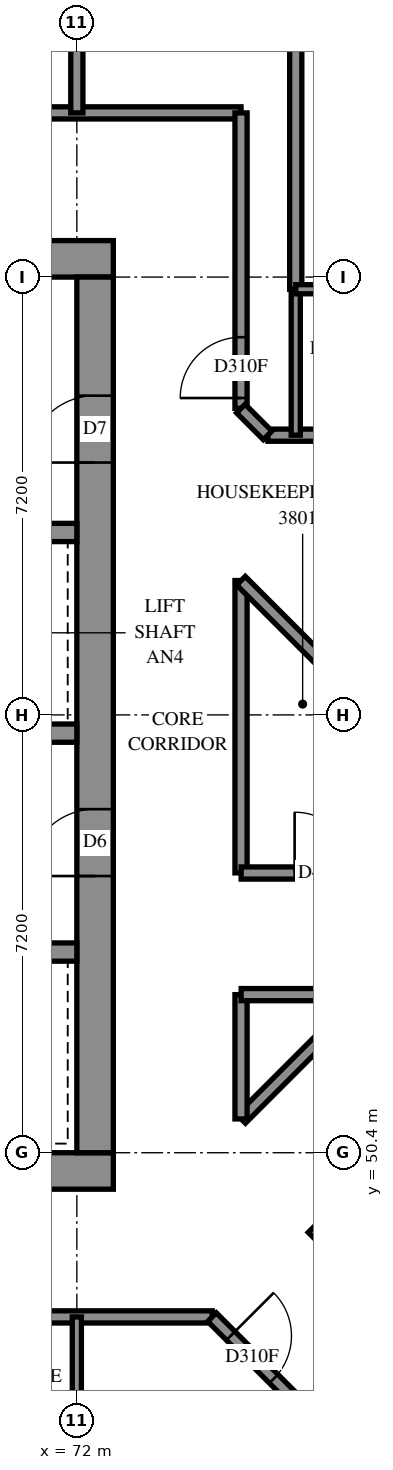
"""IFC4 building model, lengths in metres.
Left out: names, types, materials, properties, quantities, classifications, styles, units other than length and angle.
Written with IfcOpenShell. Run it as: python <this file> out.ifc"""

import sys

from ifc_helpers import new_model, si_unit, direction, frame, frame_2d, origin, place, context, subcontext, project, spatial, rectangle, extrude, element, fill, save


model = new_model("IFC4")
c1 = context("Model", 3, precision=1e-05, world=origin(), true_north=direction((0.0, 1.0)))
c2 = subcontext(c1, "Body", "Model", "MODEL_VIEW")
j1 = project(units=[si_unit("LENGTHUNIT", "METRE"), si_unit("PLANEANGLEUNIT", "RADIAN")], contexts=[c1])
p1 = place(None, origin())
s1 = spatial("IfcSite", under=j1, at=p1, CompositionType="ELEMENT")
p2 = place(p1, origin())
s2 = spatial("IfcBuilding", under=s1, at=p2, CompositionType="ELEMENT")
p3 = place(p2, frame((0.0, 0.0, 142.2)))
s3 = spatial("IfcBuildingStorey", under=s2, at=p3, CompositionType="ELEMENT", Elevation=142.2)
p4 = place(p3, frame((57.0, 50.1, -0.3), z_axis=(0.0, 0.0, 1.0), x_axis=(1.0, 0.0, 0.0)))
e1 = element("IfcWall", 1, at=p4, inside=s3, PredefinedType="SHEAR", context=c2, shape_type="SweptSolid", body=[
    extrude(rectangle(XDim=15.6, YDim=0.6, at=frame_2d((7.8, 0.0))), origin(), (0.0, 0.0, 1.0), 2.7),
])
p5 = place(p3, frame((57.0, 65.1, -0.3), z_axis=(0.0, 0.0, 1.0), x_axis=(1.0, 0.0, 0.0)))
e2 = element("IfcWall", 2, at=p5, inside=s3, PredefinedType="SHEAR", context=c2, shape_type="SweptSolid", body=[
    extrude(rectangle(XDim=15.6, YDim=0.6, at=frame_2d((7.8, 0.0))), origin(), (0.0, 0.0, 1.0), 2.7),
])
p6 = place(p5, frame((10.6, 0.0, 0.3)))
e3 = element("IfcOpeningElement", 3, at=p6, cuts=e2, PredefinedType="OPENING", context=c2, shape_type="SweptSolid", body=[
    extrude(rectangle(XDim=0.8, YDim=2.1, at=frame_2d((0.4, 1.05))), frame((0.0, 0.31, 0.0), z_axis=(0.0, -1.0, 0.0), x_axis=(1.0, 0.0, 0.0)), (0.0, 0.0, 1.0), 0.62),
])
p7 = place(p3, frame((72.3, 50.4, -0.3), z_axis=(0.0, 0.0, 1.0), x_axis=(0.0, 1.0, 0.0)))
e4 = element("IfcWall", 4, at=p7, inside=s3, PredefinedType="SHEAR", context=c2, shape_type="SweptSolid", body=[
    extrude(rectangle(XDim=14.4, YDim=0.6, at=frame_2d((7.2, 0.0))), origin(), (0.0, 0.0, 1.0), 2.7),
])
p8 = place(p7, frame((4.55, 0.0, 0.3)))
e5 = element("IfcOpeningElement", 5, at=p8, cuts=e4, PredefinedType="OPENING", context=c2, shape_type="SweptSolid", body=[
    extrude(rectangle(XDim=1.1, YDim=2.1, at=frame_2d((0.55, 1.05))), frame((0.0, 0.31, 0.0), z_axis=(0.0, -1.0, 0.0), x_axis=(1.0, 0.0, 0.0)), (0.0, 0.0, 1.0), 0.62),
])
p9 = place(p7, frame((11.35, 0.0, 0.3)))
e6 = element("IfcOpeningElement", 6, at=p9, cuts=e4, PredefinedType="OPENING", context=c2, shape_type="SweptSolid", body=[
    extrude(rectangle(XDim=1.1, YDim=2.1, at=frame_2d((0.55, 1.05))), frame((0.0, 0.31, 0.0), z_axis=(0.0, -1.0, 0.0), x_axis=(1.0, 0.0, 0.0)), (0.0, 0.0, 1.0), 0.62),
])
p10 = place(p3, frame((57.6, 53.7, 0.0), z_axis=(0.0, 0.0, 1.0), x_axis=(1.0, 0.0, 0.0)))
e7 = element("IfcWall", 7, at=p10, inside=s3, PredefinedType="SOLIDWALL", context=c2, shape_type="SweptSolid", body=[
    extrude(rectangle(XDim=14.4, YDim=0.3, at=frame_2d((7.2, 0.0))), origin(), (0.0, 0.0, 1.0), 3.1),
])
p11 = place(p10, frame((1.35, 0.0, 0.0)))
e8 = element("IfcOpeningElement", 8, at=p11, cuts=e7, PredefinedType="OPENING", context=c2, shape_type="SweptSolid", body=[
    extrude(rectangle(XDim=0.9, YDim=2.1, at=frame_2d((0.45, 1.05))), frame((0.0, 0.16, 0.0), z_axis=(0.0, -1.0, 0.0), x_axis=(1.0, 0.0, 0.0)), (0.0, 0.0, 1.0), 0.32),
])
p12 = place(p10, frame((4.95, 0.0, 0.0)))
e9 = element("IfcOpeningElement", 9, at=p12, cuts=e7, PredefinedType="OPENING", context=c2, shape_type="SweptSolid", body=[
    extrude(rectangle(XDim=0.9, YDim=2.1, at=frame_2d((0.45, 1.05))), frame((0.0, 0.16, 0.0), z_axis=(0.0, -1.0, 0.0), x_axis=(1.0, 0.0, 0.0)), (0.0, 0.0, 1.0), 0.32),
])
p13 = place(p10, frame((8.55, 0.0, 0.0)))
e10 = element("IfcOpeningElement", 10, at=p13, cuts=e7, PredefinedType="OPENING", context=c2, shape_type="SweptSolid", body=[
    extrude(rectangle(XDim=0.9, YDim=2.1, at=frame_2d((0.45, 1.05))), frame((0.0, 0.16, 0.0), z_axis=(0.0, -1.0, 0.0), x_axis=(1.0, 0.0, 0.0)), (0.0, 0.0, 1.0), 0.32),
])
p14 = place(p10, frame((12.05, 0.0, 0.0)))
e11 = element("IfcOpeningElement", 11, at=p14, cuts=e7, PredefinedType="OPENING", context=c2, shape_type="SweptSolid", body=[
    extrude(rectangle(XDim=1.1, YDim=2.1, at=frame_2d((0.55, 1.05))), frame((0.0, 0.16, 0.0), z_axis=(0.0, -1.0, 0.0), x_axis=(1.0, 0.0, 0.0)), (0.0, 0.0, 1.0), 0.32),
])
p15 = place(p3, frame((57.6, 57.3, 0.0), z_axis=(0.0, 0.0, 1.0), x_axis=(1.0, 0.0, 0.0)))
e12 = element("IfcWall", 12, at=p15, inside=s3, PredefinedType="SOLIDWALL", context=c2, shape_type="SweptSolid", body=[
    extrude(rectangle(XDim=14.4, YDim=0.3, at=frame_2d((7.2, 0.0))), origin(), (0.0, 0.0, 1.0), 3.1),
])
p16 = place(p15, frame((1.25, 0.0, 0.0)))
e13 = element("IfcOpeningElement", 13, at=p16, cuts=e12, PredefinedType="OPENING", context=c2, shape_type="SweptSolid", body=[
    extrude(rectangle(XDim=1.1, YDim=2.1, at=frame_2d((0.55, 1.05))), frame((0.0, 0.16, 0.0), z_axis=(0.0, -1.0, 0.0), x_axis=(1.0, 0.0, 0.0)), (0.0, 0.0, 1.0), 0.32),
])
p17 = place(p15, frame((4.85, 0.0, 0.0)))
e14 = element("IfcOpeningElement", 14, at=p17, cuts=e12, PredefinedType="OPENING", context=c2, shape_type="SweptSolid", body=[
    extrude(rectangle(XDim=1.1, YDim=2.1, at=frame_2d((0.55, 1.05))), frame((0.0, 0.16, 0.0), z_axis=(0.0, -1.0, 0.0), x_axis=(1.0, 0.0, 0.0)), (0.0, 0.0, 1.0), 0.32),
])
p18 = place(p15, frame((8.45, 0.0, 0.0)))
e15 = element("IfcOpeningElement", 15, at=p18, cuts=e12, PredefinedType="OPENING", context=c2, shape_type="SweptSolid", body=[
    extrude(rectangle(XDim=1.1, YDim=2.1, at=frame_2d((0.55, 1.05))), frame((0.0, 0.16, 0.0), z_axis=(0.0, -1.0, 0.0), x_axis=(1.0, 0.0, 0.0)), (0.0, 0.0, 1.0), 0.32),
])
p19 = place(p15, frame((12.05, 0.0, 0.0)))
e16 = element("IfcOpeningElement", 16, at=p19, cuts=e12, PredefinedType="OPENING", context=c2, shape_type="SweptSolid", body=[
    extrude(rectangle(XDim=1.1, YDim=2.1, at=frame_2d((0.55, 1.05))), frame((0.0, 0.16, 0.0), z_axis=(0.0, -1.0, 0.0), x_axis=(1.0, 0.0, 0.0)), (0.0, 0.0, 1.0), 0.32),
])
p20 = place(p3, frame((64.8, 60.6, 0.0), z_axis=(0.0, 0.0, 1.0), x_axis=(1.0, 0.0, 0.0)))
e17 = element("IfcWall", 17, at=p20, inside=s3, PredefinedType="SOLIDWALL", context=c2, shape_type="SweptSolid", body=[
    extrude(rectangle(XDim=7.2, YDim=0.3, at=frame_2d((3.6, 0.0))), origin(), (0.0, 0.0, 1.0), 3.1),
])
p21 = place(p3, frame((76.018, 49.302, -0.3), z_axis=(0.0, 0.0, 1.0), x_axis=(0.7071067812, -0.7071067812, 0.0)))
e18 = element("IfcWall", 18, at=p21, inside=s3, PredefinedType="SHEAR", context=c2, shape_type="SweptSolid", body=[
    extrude(rectangle(XDim=15.6, YDim=0.6, at=frame_2d((7.8, 0.0))), origin(), (0.0, 0.0, 1.0), 2.7),
])
p22 = place(p3, frame((54.9, 67.5, 0.0), z_axis=(0.0, 0.0, 1.0), x_axis=(1.0, 0.0, 0.0)))
e19 = element("IfcWall", 19, at=p22, inside=s3, PredefinedType="PARTITIONING", context=c2, shape_type="SweptSolid", body=[
    extrude(rectangle(XDim=19.8, YDim=0.2, at=frame_2d((9.9, 0.0))), origin(), (0.0, 0.0, 1.0), 3.1),
])
p23 = place(p22, frame((6.586, 0.0, 0.0)))
e20 = element("IfcOpeningElement", 20, at=p23, cuts=e19, PredefinedType="OPENING", context=c2, shape_type="SweptSolid", body=[
    extrude(rectangle(XDim=1.0, YDim=2.1, at=frame_2d((0.5, 1.05))), frame((0.0, 0.11, 0.0), z_axis=(0.0, -1.0, 0.0), x_axis=(1.0, 0.0, 0.0)), (0.0, 0.0, 1.0), 0.22),
])
p24 = place(p22, frame((14.089, 0.0, 0.0)))
e21 = element("IfcOpeningElement", 21, at=p24, cuts=e19, PredefinedType="OPENING", context=c2, shape_type="SweptSolid", body=[
    extrude(rectangle(XDim=1.0, YDim=2.1, at=frame_2d((0.5, 1.05))), frame((0.0, 0.11, 0.0), z_axis=(0.0, -1.0, 0.0), x_axis=(1.0, 0.0, 0.0)), (0.0, 0.0, 1.0), 0.22),
])
p25 = place(p3, frame((54.9, 47.7, 0.0), z_axis=(0.0, 0.0, 1.0), x_axis=(1.0, 0.0, 0.0)))
e22 = element("IfcWall", 22, at=p25, inside=s3, PredefinedType="PARTITIONING", context=c2, shape_type="SweptSolid", body=[
    extrude(rectangle(XDim=19.326, YDim=0.2, at=frame_2d((9.663, 0.0))), origin(), (0.0, 0.0, 1.0), 3.1),
])
p26 = place(p25, frame((5.0, 0.0, 0.0)))
e23 = element("IfcOpeningElement", 23, at=p26, cuts=e22, PredefinedType="OPENING", context=c2, shape_type="SweptSolid", body=[
    extrude(rectangle(XDim=0.9, YDim=2.1, at=frame_2d((0.45, 1.05))), frame((0.0, 0.11, 0.0), z_axis=(0.0, -1.0, 0.0), x_axis=(1.0, 0.0, 0.0)), (0.0, 0.0, 1.0), 0.22),
])
p27 = place(p25, frame((12.2, 0.0, 0.0)))
e24 = element("IfcOpeningElement", 24, at=p27, cuts=e22, PredefinedType="OPENING", context=c2, shape_type="SweptSolid", body=[
    extrude(rectangle(XDim=0.9, YDim=2.1, at=frame_2d((0.45, 1.05))), frame((0.0, 0.11, 0.0), z_axis=(0.0, -1.0, 0.0), x_axis=(1.0, 0.0, 0.0)), (0.0, 0.0, 1.0), 0.22),
])
p28 = place(p25, frame((6.7, 0.0, 0.0)))
e25 = element("IfcOpeningElement", 25, at=p28, cuts=e22, PredefinedType="OPENING", context=c2, shape_type="SweptSolid", body=[
    extrude(rectangle(XDim=0.9, YDim=2.1, at=frame_2d((0.45, 1.05))), frame((0.0, 0.11, 0.0), z_axis=(0.0, -1.0, 0.0), x_axis=(1.0, 0.0, 0.0)), (0.0, 0.0, 1.0), 0.22),
])
p29 = place(p25, frame((13.9, 0.0, 0.0)))
e26 = element("IfcOpeningElement", 26, at=p29, cuts=e22, PredefinedType="OPENING", context=c2, shape_type="SweptSolid", body=[
    extrude(rectangle(XDim=0.9, YDim=2.1, at=frame_2d((0.45, 1.05))), frame((0.0, 0.11, 0.0), z_axis=(0.0, -1.0, 0.0), x_axis=(1.0, 0.0, 0.0)), (0.0, 0.0, 1.0), 0.22),
])
p30 = place(p3, frame((75.6, 64.6, 0.0), z_axis=(0.0, 0.0, 1.0), x_axis=(0.0, 1.0, 0.0)))
e27 = element("IfcWall", 27, at=p30, inside=s3, PredefinedType="PARTITIONING", context=c2, shape_type="SweptSolid", body=[
    extrude(rectangle(XDim=8.165, YDim=0.2, at=frame_2d((4.082, 0.0))), origin(), (0.0, 0.0, 1.0), 3.1),
])
p31 = place(p3, frame((74.7, 62.642, 0.0), z_axis=(0.0, 0.0, 1.0), x_axis=(0.0, 1.0, 0.0)))
e28 = element("IfcWall", 28, at=p31, inside=s3, PredefinedType="PARTITIONING", context=c2, shape_type="SweptSolid", body=[
    extrude(rectangle(XDim=4.858, YDim=0.2, at=frame_2d((2.429, 0.0))), origin(), (0.0, 0.0, 1.0), 3.1),
])
p32 = place(p31, frame((0.169, 0.0, 0.0)))
e29 = element("IfcOpeningElement", 29, at=p32, cuts=e28, PredefinedType="OPENING", context=c2, shape_type="SweptSolid", body=[
    extrude(rectangle(XDim=1.0, YDim=2.1, at=frame_2d((0.5, 1.05))), frame((0.0, 0.11, 0.0), z_axis=(0.0, -1.0, 0.0), x_axis=(1.0, 0.0, 0.0)), (0.0, 0.0, 1.0), 0.22),
])
p33 = place(p3, frame((74.7, 55.002, 0.0), z_axis=(0.0, 0.0, 1.0), x_axis=(0.0, 1.0, 0.0)))
e30 = element("IfcWall", 30, at=p33, inside=s3, PredefinedType="PARTITIONING", context=c2, shape_type="SweptSolid", body=[
    extrude(rectangle(XDim=4.808, YDim=0.2, at=frame_2d((2.404, 0.0))), origin(), (0.0, 0.0, 1.0), 3.1),
])
p34 = place(p3, frame((74.223, 47.697, 0.0), z_axis=(0.0, 0.0, 1.0), x_axis=(0.7071067812, -0.7071067812, 0.0)))
e31 = element("IfcWall", 31, at=p34, inside=s3, PredefinedType="PARTITIONING", context=c2, shape_type="SweptSolid", body=[
    extrude(rectangle(XDim=4.63, YDim=0.2, at=frame_2d((2.315, 0.0))), origin(), (0.0, 0.0, 1.0), 3.1),
])
p35 = place(p34, frame((0.434, 0.0, 0.0)))
e32 = element("IfcOpeningElement", 32, at=p35, cuts=e31, PredefinedType="OPENING", context=c2, shape_type="SweptSolid", body=[
    extrude(rectangle(XDim=1.0, YDim=2.1, at=frame_2d((0.5, 1.05))), frame((0.0, 0.11, 0.0), z_axis=(0.0, -1.0, 0.0), x_axis=(1.0, 0.0, 0.0)), (0.0, 0.0, 1.0), 0.22),
])
p36 = place(p3, frame((75.142, 62.2, 0.0), z_axis=(0.0, 0.0, 1.0), x_axis=(1.0, 0.0, 0.0)))
e33 = element("IfcWall", 33, at=p36, inside=s3, PredefinedType="PARTITIONING", context=c2, shape_type="SweptSolid", body=[
    extrude(rectangle(XDim=4.058, YDim=0.2, at=frame_2d((2.029, 0.0))), origin(), (0.0, 0.0, 1.0), 3.1),
])
p37 = place(p36, frame((2.758, 0.0, 0.0)))
e34 = element("IfcOpeningElement", 34, at=p37, cuts=e33, PredefinedType="OPENING", context=c2, shape_type="SweptSolid", body=[
    extrude(rectangle(XDim=0.9, YDim=2.1, at=frame_2d((0.45, 1.05))), frame((0.0, 0.11, 0.0), z_axis=(0.0, -1.0, 0.0), x_axis=(1.0, 0.0, 0.0)), (0.0, 0.0, 1.0), 0.22),
])
p38 = place(p3, frame((74.702, 55.0, 0.0), z_axis=(0.0, 0.0, 1.0), x_axis=(1.0, 0.0, 0.0)))
e35 = element("IfcWall", 35, at=p38, inside=s3, PredefinedType="PARTITIONING", context=c2, shape_type="SweptSolid", body=[
    extrude(rectangle(XDim=4.044, YDim=0.2, at=frame_2d((2.022, 0.0))), origin(), (0.0, 0.0, 1.0), 3.1),
])
p39 = place(p38, frame((0.879, 0.0, 0.0)))
e36 = element("IfcOpeningElement", 36, at=p39, cuts=e35, PredefinedType="OPENING", context=c2, shape_type="SweptSolid", body=[
    extrude(rectangle(XDim=1.0, YDim=2.1, at=frame_2d((0.5, 1.05))), frame((0.0, 0.11, 0.0), z_axis=(0.0, -1.0, 0.0), x_axis=(1.0, 0.0, 0.0)), (0.0, 0.0, 1.0), 0.22),
])
p40 = place(p3, frame((74.699, 59.807, 0.0), z_axis=(0.0, 0.0, 1.0), x_axis=(0.7071067812, -0.7071067812, 0.0)))
e37 = element("IfcWall", 37, at=p40, inside=s3, PredefinedType="PARTITIONING", context=c2, shape_type="SweptSolid", body=[
    extrude(rectangle(XDim=3.957, YDim=0.2, at=frame_2d((1.978, 0.0))), origin(), (0.0, 0.0, 1.0), 3.1),
])
p41 = place(p3, frame((72.0, 67.5, 0.0), z_axis=(0.0, 0.0, 1.0), x_axis=(0.0, 1.0, 0.0)))
e38 = element("IfcWall", 38, at=p41, inside=s3, PredefinedType="PARTITIONING", context=c2, shape_type="SweptSolid", body=[
    extrude(rectangle(XDim=3.946, YDim=0.2, at=frame_2d((1.973, 0.0))), origin(), (0.0, 0.0, 1.0), 3.1),
])
p42 = place(p3, frame((74.701, 50.957, 0.0), z_axis=(0.0, 0.0, 1.0), x_axis=(0.7071067812, 0.7071067812, 0.0)))
e39 = element("IfcWall", 39, at=p42, inside=s3, PredefinedType="PARTITIONING", context=c2, shape_type="SweptSolid", body=[
    extrude(rectangle(XDim=2.888, YDim=0.2, at=frame_2d((1.444, 0.0))), origin(), (0.0, 0.0, 1.0), 3.1),
])
for number, where, z_axis, x_axis in (
    (40, (72.0, 45.3, 0.0), (0.0, 0.0, 1.0), (0.0, 1.0, 0.0)),
    (41, (75.6, 62.2, 0.0), (0.0, 0.0, 1.0), (0.0, 1.0, 0.0)),
):
    element("IfcWall", number, at=place(p3, frame(where, z_axis=z_axis, x_axis=x_axis)), inside=s3, PredefinedType="PARTITIONING", context=c2, shape_type="SweptSolid", body=[
        extrude(rectangle(XDim=2.4, YDim=0.15, at=frame_2d((1.2, 0.0))), origin(), (0.0, 0.0, 1.0), 3.1),
    ])
p43 = place(p3, frame((74.7, 50.956, 0.0), z_axis=(0.0, 0.0, 1.0), x_axis=(0.0, 1.0, 0.0)))
e42 = element("IfcWall", 42, at=p43, inside=s3, PredefinedType="PARTITIONING", context=c2, shape_type="SweptSolid", body=[
    extrude(rectangle(XDim=2.044, YDim=0.2, at=frame_2d((1.022, 0.0))), origin(), (0.0, 0.0, 1.0), 3.1),
])
p44 = place(p3, frame((74.702, 53.0, 0.0), z_axis=(0.0, 0.0, 1.0), x_axis=(1.0, 0.0, 0.0)))
e43 = element("IfcWall", 43, at=p44, inside=s3, PredefinedType="PARTITIONING", context=c2, shape_type="SweptSolid", body=[
    extrude(rectangle(XDim=2.042, YDim=0.2, at=frame_2d((1.021, 0.0))), origin(), (0.0, 0.0, 1.0), 3.1),
])
p45 = place(p3, frame((75.6, 64.6, 0.0), z_axis=(0.0, 0.0, 1.0), x_axis=(1.0, 0.0, 0.0)))
e44 = element("IfcWall", 44, at=p45, inside=s3, PredefinedType="PARTITIONING", context=c2, shape_type="SweptSolid", body=[
    extrude(rectangle(XDim=1.9, YDim=0.15, at=frame_2d((0.95, 0.0))), origin(), (0.0, 0.0, 1.0), 3.1),
])
p46 = place(p45, frame((0.607, 0.0, 0.0)))
e45 = element("IfcOpeningElement", 45, at=p46, cuts=e44, PredefinedType="OPENING", context=c2, shape_type="SweptSolid", body=[
    extrude(rectangle(XDim=0.8, YDim=2.1, at=frame_2d((0.4, 1.05))), frame((0.0, 0.085, 0.0), z_axis=(0.0, -1.0, 0.0), x_axis=(1.0, 0.0, 0.0)), (0.0, 0.0, 1.0), 0.17),
])
p47 = place(p3, frame((74.697, 62.637, 0.0), z_axis=(0.0, 0.0, 1.0), x_axis=(0.7071067812, -0.7071067812, 0.0)))
e46 = element("IfcWall", 46, at=p47, inside=s3, PredefinedType="PARTITIONING", context=c2, shape_type="SweptSolid", body=[
    extrude(rectangle(XDim=0.622, YDim=0.2, at=frame_2d((0.311, 0.0))), origin(), (0.0, 0.0, 1.0), 3.1),
])
p48 = place(p8, origin())
e47 = element("IfcDoor", 47, at=p48, inside=s3, OperationType="DOUBLE_DOOR_SINGLE_SWING", PredefinedType="DOOR", context=c2, shape_type="SweptSolid", body=[
    extrude(rectangle(XDim=1.1, YDim=2.1, at=frame_2d((0.55, 1.05))), frame((0.0, 0.025, 0.0), z_axis=(0.0, -1.0, 0.0), x_axis=(1.0, 0.0, 0.0)), (0.0, 0.0, 1.0), 0.05),
])
fill(e5, e47)
p49 = place(p9, origin())
e48 = element("IfcDoor", 48, at=p49, inside=s3, OperationType="SINGLE_SWING_RIGHT", PredefinedType="DOOR", context=c2, shape_type="SweptSolid", body=[
    extrude(rectangle(XDim=1.1, YDim=2.1, at=frame_2d((0.55, 1.05))), frame((0.0, 0.025, 0.0), z_axis=(0.0, -1.0, 0.0), x_axis=(1.0, 0.0, 0.0)), (0.0, 0.0, 1.0), 0.05),
])
fill(e6, e48)
p50 = place(p39, origin())
e49 = element("IfcDoor", 49, at=p50, inside=s3, OperationType="SINGLE_SWING_LEFT", PredefinedType="DOOR", context=c2, shape_type="SweptSolid", body=[
    extrude(rectangle(XDim=1.0, YDim=2.1, at=frame_2d((0.5, 1.05))), frame((0.0, 0.025, 0.0), z_axis=(0.0, -1.0, 0.0), x_axis=(1.0, 0.0, 0.0)), (0.0, 0.0, 1.0), 0.05),
])
fill(e36, e49)
p51 = place(p32, origin())
e50 = element("IfcDoor", 50, at=p51, inside=s3, OperationType="SINGLE_SWING_RIGHT", PredefinedType="DOOR", context=c2, shape_type="SweptSolid", body=[
    extrude(rectangle(XDim=1.0, YDim=2.1, at=frame_2d((0.5, 1.05))), frame((0.0, 0.025, 0.0), z_axis=(0.0, -1.0, 0.0), x_axis=(1.0, 0.0, 0.0)), (0.0, 0.0, 1.0), 0.05),
])
fill(e29, e50)
p52 = place(p35, origin())
e51 = element("IfcDoor", 51, at=p52, inside=s3, OperationType="SINGLE_SWING_LEFT", PredefinedType="DOOR", context=c2, shape_type="SweptSolid", body=[
    extrude(rectangle(XDim=1.0, YDim=2.1, at=frame_2d((0.5, 1.05))), frame((0.0, 0.025, 0.0), z_axis=(0.0, -1.0, 0.0), x_axis=(1.0, 0.0, 0.0)), (0.0, 0.0, 1.0), 0.05),
])
fill(e32, e51)
save(model, sys.argv[1])
